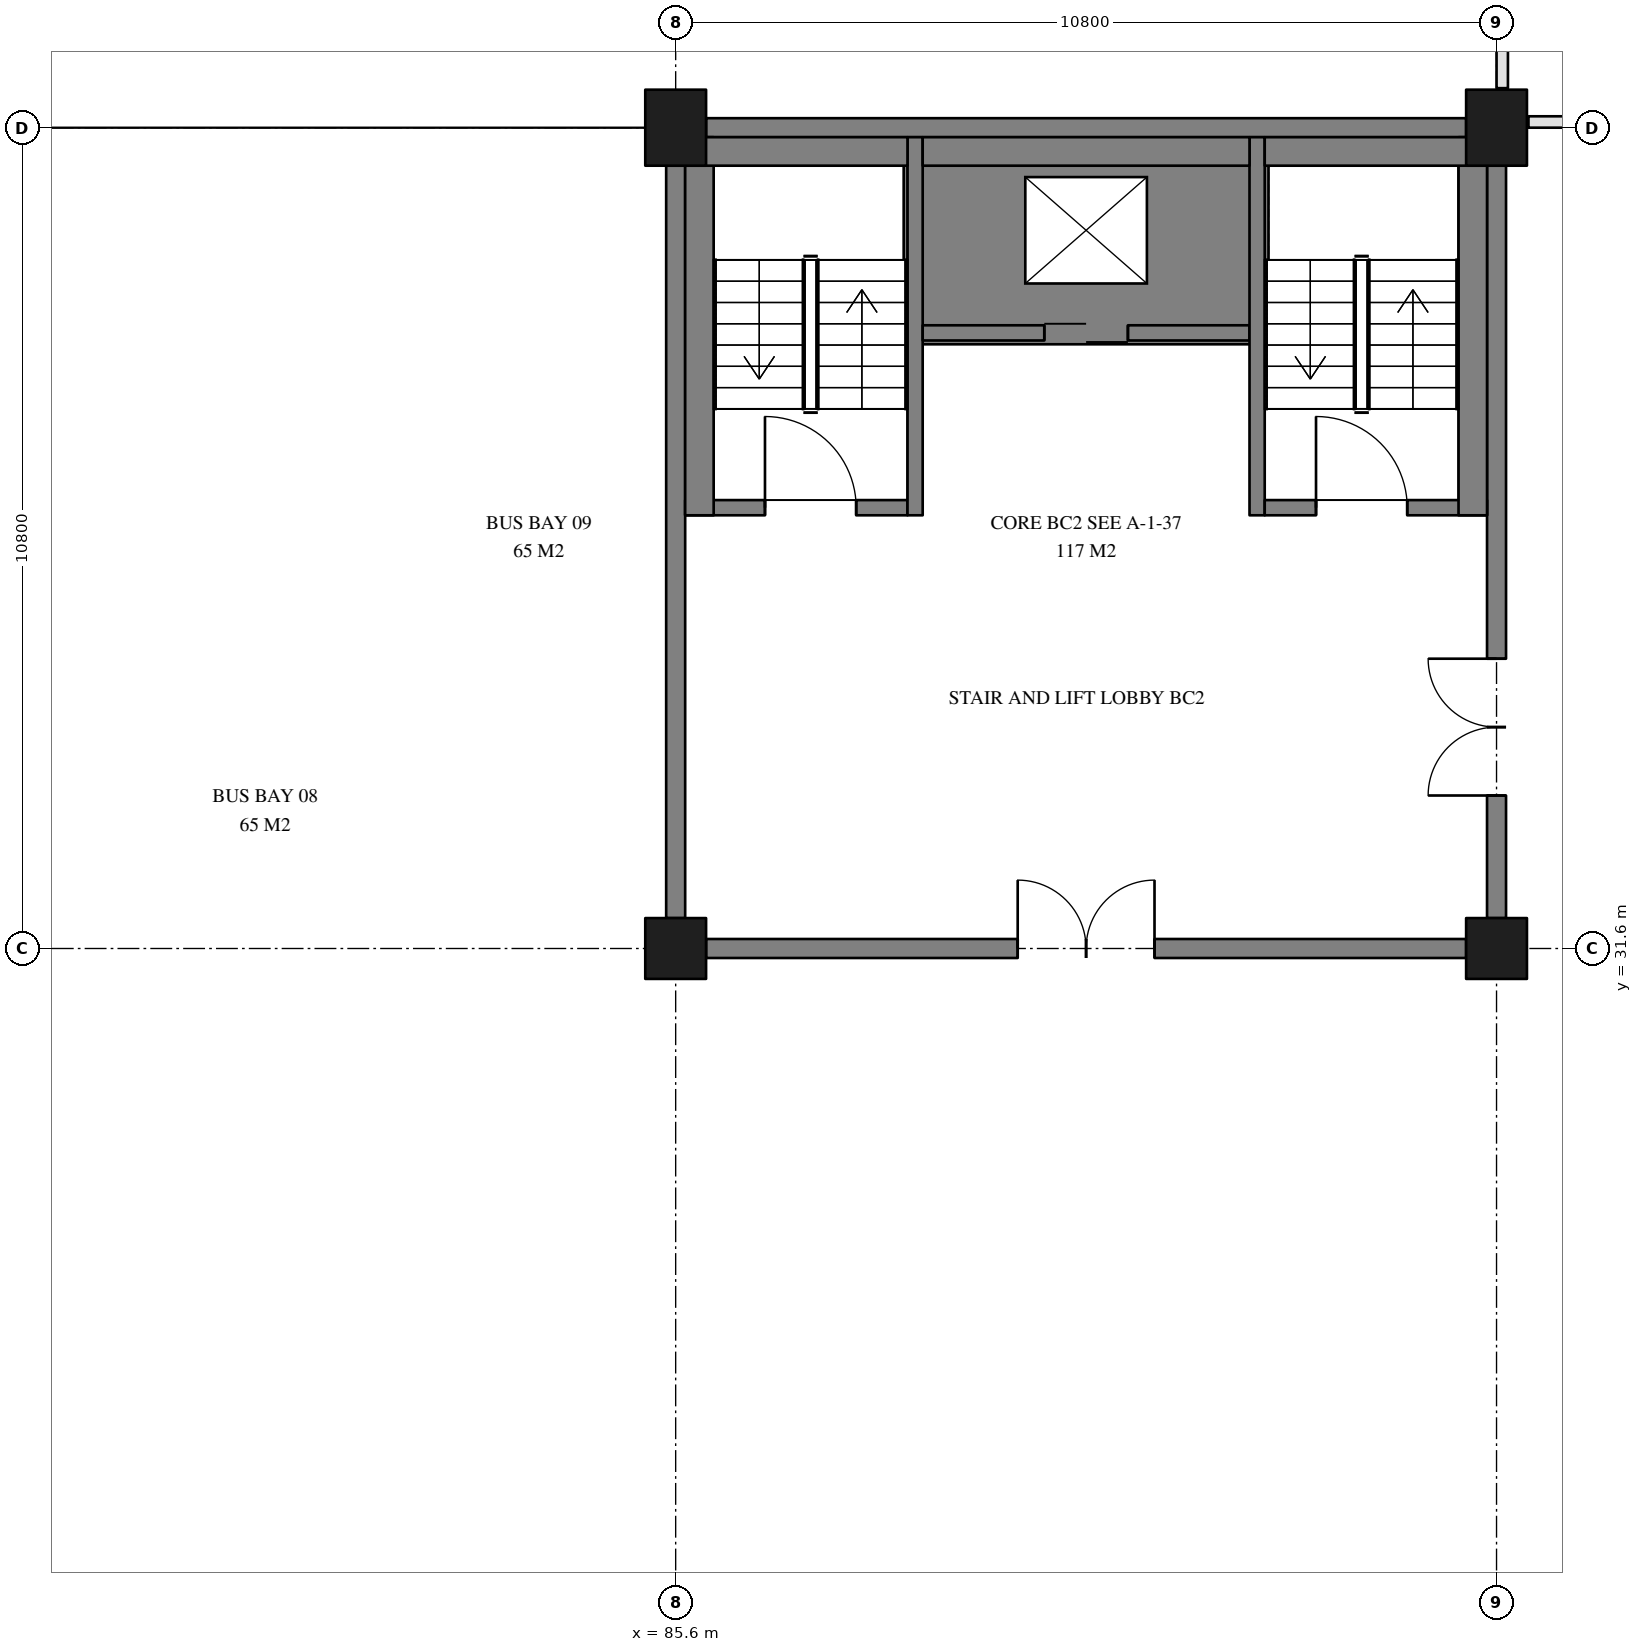
"""IFC4 building model, lengths in metres.
Left out: names, types, materials, properties, quantities, classifications, styles, units other than length and angle.
Written with IfcOpenShell. Run it as: python <this file> out.ifc"""

import sys

from ifc_helpers import new_model, si_unit, direction, frame, frame_2d, origin, origin_2d, place, context, subcontext, project, spatial, polyline, rectangle, outline, extrude, element, fill, save


model = new_model("IFC4")
c1 = context("Model", 3, precision=1e-05, world=origin(), true_north=direction((0.0, 1.0)))
c2 = subcontext(c1, "Body", "Model", "MODEL_VIEW")
j1 = project(units=[si_unit("LENGTHUNIT", "METRE"), si_unit("PLANEANGLEUNIT", "RADIAN")], contexts=[c1])
p1 = place(None, origin())
s1 = spatial("IfcSite", under=j1, at=p1, CompositionType="ELEMENT")
p2 = place(p1, origin())
s2 = spatial("IfcBuilding", under=s1, at=p2, CompositionType="ELEMENT")
p3 = place(p2, frame((0.0, 0.0, -5.4)))
s3 = spatial("IfcBuildingStorey", under=s2, at=p3, CompositionType="ELEMENT", Elevation=-5.4)
for number, where, z_axis, x_axis in (
    (1, (85.6, 42.4, -0.4), (0.0, 0.0, 1.0), (1.0, 0.0, 0.0)),
    (2, (96.4, 42.4, -0.4), (0.0, 0.0, 1.0), (1.0, 0.0, 0.0)),
):
    element("IfcColumn", number, at=place(p3, frame(where, z_axis=z_axis, x_axis=x_axis)), inside=s3, PredefinedType="COLUMN", context=c2, shape_type="SweptSolid", body=[
        extrude(rectangle(XDim=0.8, YDim=1.0, at=origin_2d()), origin(), (0.0, 0.0, 1.0), 5.8),
    ])
for number, where, z_axis, x_axis in (
    (3, (85.6, 31.6, -0.4), (0.0, 0.0, 1.0), (1.0, 0.0, 0.0)),
    (4, (96.4, 31.6, -0.4), (0.0, 0.0, 1.0), (1.0, 0.0, 0.0)),
):
    element("IfcColumn", number, at=place(p3, frame(where, z_axis=z_axis, x_axis=x_axis)), inside=s3, PredefinedType="COLUMN", context=c2, shape_type="SweptSolid", body=[
        extrude(rectangle(XDim=0.8, YDim=0.8, at=origin_2d()), origin(), (0.0, 0.0, 1.0), 5.8),
    ])
p4 = place(p3, frame((0.0, 0.0, -1.4)))
e5 = element("IfcWall", 5, at=p4, inside=s3, PredefinedType="SOLIDWALL", context=c2, shape_type="SweptSolid", body=[
    extrude(outline(polyline([(88.6, 39.55), (93.4, 39.55), (93.4, 42.15), (88.6, 42.15), (88.6, 39.55)]), holes=[polyline([(93.15, 39.8), (93.15, 41.9), (88.85, 41.9), (88.85, 39.8), (93.15, 39.8)])]), origin(), (0.0, 0.0, 1.0), 1.4),
])
p5 = place(p3, frame((86.0, 31.6, 0.0), z_axis=(0.0, 0.0, 1.0), x_axis=(1.0, 0.0, 0.0)))
e6 = element("IfcWall", 6, at=p5, inside=s3, PredefinedType="SOLIDWALL", context=c2, shape_type="SweptSolid", body=[
    extrude(rectangle(XDim=10.0, YDim=0.25, at=frame_2d((5.0, 0.0))), origin(), (0.0, 0.0, 1.0), 5.4),
])
p6 = place(p5, frame((4.1, 0.0, 0.0)))
e7 = element("IfcOpeningElement", 7, at=p6, cuts=e6, PredefinedType="OPENING", context=c2, shape_type="SweptSolid", body=[
    extrude(rectangle(XDim=1.8, YDim=2.1, at=frame_2d((0.9, 1.05))), frame((0.0, 0.135, 0.0), z_axis=(0.0, -1.0, 0.0), x_axis=(1.0, 0.0, 0.0)), (0.0, 0.0, 1.0), 0.27),
])
p7 = place(p3, frame((96.4, 32.0, 0.0), z_axis=(0.0, 0.0, 1.0), x_axis=(0.0, 1.0, 0.0)))
e8 = element("IfcWall", 8, at=p7, inside=s3, PredefinedType="SOLIDWALL", context=c2, shape_type="SweptSolid", body=[
    extrude(rectangle(XDim=9.9, YDim=0.25, at=frame_2d((4.95, 0.0))), origin(), (0.0, 0.0, 1.0), 5.4),
])
p8 = place(p7, frame((1.613, 0.0, 0.0)))
e9 = element("IfcOpeningElement", 9, at=p8, cuts=e8, PredefinedType="OPENING", context=c2, shape_type="SweptSolid", body=[
    extrude(rectangle(XDim=1.8, YDim=2.1, at=frame_2d((0.9, 1.05))), frame((0.0, 0.135, 0.0), z_axis=(0.0, -1.0, 0.0), x_axis=(1.0, 0.0, 0.0)), (0.0, 0.0, 1.0), 0.27),
])
p9 = place(p3, frame((96.0, 42.4, 0.0), z_axis=(0.0, 0.0, 1.0), x_axis=(-1.0, 0.0, 0.0)))
e10 = element("IfcWall", 10, at=p9, inside=s3, PredefinedType="SOLIDWALL", context=c2, shape_type="SweptSolid", body=[
    extrude(rectangle(XDim=10.0, YDim=0.25, at=frame_2d((5.0, 0.0))), origin(), (0.0, 0.0, 1.0), 5.4),
])
p10 = place(p3, frame((85.6, 41.9, 0.0), z_axis=(0.0, 0.0, 1.0), x_axis=(0.0, -1.0, 0.0)))
e11 = element("IfcWall", 11, at=p10, inside=s3, PredefinedType="SOLIDWALL", context=c2, shape_type="SweptSolid", body=[
    extrude(rectangle(XDim=9.9, YDim=0.25, at=frame_2d((4.95, 0.0))), origin(), (0.0, 0.0, 1.0), 5.4),
])
p11 = place(p3, frame((85.725, 37.4, 0.0), z_axis=(0.0, 0.0, 1.0), x_axis=(1.0, 0.0, 0.0)))
e12 = element("IfcWall", 12, at=p11, inside=s3, PredefinedType="SOLIDWALL", context=c2, shape_type="SweptSolid", body=[
    extrude(rectangle(XDim=2.925, YDim=0.2, at=frame_2d((1.462, 0.0))), origin(), (0.0, 0.0, 1.0), 4.8),
])
p12 = place(p11, frame((1.05, 0.0, 0.0)))
e13 = element("IfcOpeningElement", 13, at=p12, cuts=e12, PredefinedType="OPENING", context=c2, shape_type="SweptSolid", body=[
    extrude(rectangle(XDim=1.2, YDim=2.1, at=frame_2d((0.6, 1.05))), frame((0.0, 0.11, 0.0), z_axis=(0.0, -1.0, 0.0), x_axis=(1.0, 0.0, 0.0)), (0.0, 0.0, 1.0), 0.22),
])
p13 = place(p3, frame((88.75, 37.3, 0.0), z_axis=(0.0, 0.0, 1.0), x_axis=(0.0, 1.0, 0.0)))
e14 = element("IfcWall", 14, at=p13, inside=s3, PredefinedType="SOLIDWALL", context=c2, shape_type="SweptSolid", body=[
    extrude(rectangle(XDim=4.975, YDim=0.2, at=frame_2d((2.487, 0.0))), origin(), (0.0, 0.0, 1.0), 4.8),
])
p14 = place(p3, frame((88.85, 39.7, 0.0), z_axis=(0.0, 0.0, 1.0), x_axis=(1.0, 0.0, 0.0)))
e15 = element("IfcWall", 15, at=p14, inside=s3, PredefinedType="SOLIDWALL", context=c2, shape_type="SweptSolid", body=[
    extrude(rectangle(XDim=4.3, YDim=0.2, at=frame_2d((2.15, 0.0))), origin(), (0.0, 0.0, 1.0), 4.8),
])
p15 = place(p14, frame((1.6, 0.0, 0.0)))
e16 = element("IfcOpeningElement", 16, at=p15, cuts=e15, PredefinedType="OPENING", context=c2, shape_type="SweptSolid", body=[
    extrude(rectangle(XDim=1.1, YDim=2.1, at=frame_2d((0.55, 1.05))), frame((0.0, 0.11, 0.0), z_axis=(0.0, -1.0, 0.0), x_axis=(1.0, 0.0, 0.0)), (0.0, 0.0, 1.0), 0.22),
])
p16 = place(p3, frame((93.25, 37.3, 0.0), z_axis=(0.0, 0.0, 1.0), x_axis=(0.0, 1.0, 0.0)))
e17 = element("IfcWall", 17, at=p16, inside=s3, PredefinedType="SOLIDWALL", context=c2, shape_type="SweptSolid", body=[
    extrude(rectangle(XDim=4.975, YDim=0.2, at=frame_2d((2.487, 0.0))), origin(), (0.0, 0.0, 1.0), 4.8),
])
p17 = place(p3, frame((93.35, 37.4, 0.0), z_axis=(0.0, 0.0, 1.0), x_axis=(1.0, 0.0, 0.0)))
e18 = element("IfcWall", 18, at=p17, inside=s3, PredefinedType="SOLIDWALL", context=c2, shape_type="SweptSolid", body=[
    extrude(rectangle(XDim=2.925, YDim=0.2, at=frame_2d((1.462, 0.0))), origin(), (0.0, 0.0, 1.0), 4.8),
])
p18 = place(p17, frame((0.675, 0.0, 0.0)))
e19 = element("IfcOpeningElement", 19, at=p18, cuts=e18, PredefinedType="OPENING", context=c2, shape_type="SweptSolid", body=[
    extrude(rectangle(XDim=1.2, YDim=2.1, at=frame_2d((0.6, 1.05))), frame((0.0, 0.11, 0.0), z_axis=(0.0, -1.0, 0.0), x_axis=(1.0, 0.0, 0.0)), (0.0, 0.0, 1.0), 0.22),
])
p19 = place(p3, frame((85.913, 37.3, 0.0), z_axis=(0.0, 0.0, 1.0), x_axis=(0.0, 1.0, 0.0)))
e20 = element("IfcWall", 20, at=p19, inside=s3, PredefinedType="SOLIDWALL", context=c2, shape_type="SweptSolid", body=[
    extrude(rectangle(XDim=4.975, YDim=0.375, at=frame_2d((2.487, 0.0))), origin(), (0.0, 0.0, 1.0), 4.8),
])
p20 = place(p3, frame((85.725, 42.087, 0.0), z_axis=(0.0, 0.0, 1.0), x_axis=(1.0, 0.0, 0.0)))
e21 = element("IfcWall", 21, at=p20, inside=s3, PredefinedType="SOLIDWALL", context=c2, shape_type="SweptSolid", body=[
    extrude(rectangle(XDim=2.925, YDim=0.375, at=frame_2d((1.462, 0.0))), origin(), (0.0, 0.0, 1.0), 4.8),
])
p21 = place(p3, frame((96.087, 37.3, 0.0), z_axis=(0.0, 0.0, 1.0), x_axis=(0.0, 1.0, 0.0)))
e22 = element("IfcWall", 22, at=p21, inside=s3, PredefinedType="SOLIDWALL", context=c2, shape_type="SweptSolid", body=[
    extrude(rectangle(XDim=4.975, YDim=0.375, at=frame_2d((2.487, 0.0))), origin(), (0.0, 0.0, 1.0), 4.8),
])
p22 = place(p3, frame((93.35, 42.087, 0.0), z_axis=(0.0, 0.0, 1.0), x_axis=(1.0, 0.0, 0.0)))
e23 = element("IfcWall", 23, at=p22, inside=s3, PredefinedType="SOLIDWALL", context=c2, shape_type="SweptSolid", body=[
    extrude(rectangle(XDim=2.925, YDim=0.375, at=frame_2d((1.462, 0.0))), origin(), (0.0, 0.0, 1.0), 4.8),
])
p23 = place(p3, frame((88.85, 42.087, 0.0), z_axis=(0.0, 0.0, 1.0), x_axis=(1.0, 0.0, 0.0)))
e24 = element("IfcWall", 24, at=p23, inside=s3, PredefinedType="SOLIDWALL", context=c2, shape_type="SweptSolid", body=[
    extrude(rectangle(XDim=4.3, YDim=0.375, at=frame_2d((2.15, 0.0))), origin(), (0.0, 0.0, 1.0), 4.8),
])
p24 = place(p3, frame((96.475, 42.92, 0.0), z_axis=(0.0, 0.0, 1.0), x_axis=(0.0, 1.0, 0.0)))
e25 = element("IfcWall", 25, at=p24, inside=s3, PredefinedType="PARTITIONING", context=c2, shape_type="SweptSolid", body=[
    extrude(rectangle(XDim=9.76, YDim=0.15, at=frame_2d((4.88, 0.0))), origin(), (0.0, 0.0, 1.0), 3.8),
])
p25 = place(p3, frame((96.82, 42.475, 0.0), z_axis=(0.0, 0.0, 1.0), x_axis=(1.0, 0.0, 0.0)))
e26 = element("IfcWall", 26, at=p25, inside=s3, PredefinedType="PARTITIONING", context=c2, shape_type="SweptSolid", body=[
    extrude(rectangle(XDim=3.18, YDim=0.15, at=frame_2d((1.59, 0.0))), origin(), (0.0, 0.0, 1.0), 3.8),
])
p26 = place(p15, frame((1.1, 0.0, 0.0), z_axis=(0.0, 0.0, 1.0), x_axis=(-1.0, 0.0, 0.0)))
e27 = element("IfcDoor", 27, at=p26, inside=s3, OperationType="DOUBLE_DOOR_SLIDING", PredefinedType="DOOR", context=c2, shape_type="SweptSolid", body=[
    extrude(rectangle(XDim=1.1, YDim=2.1, at=frame_2d((0.55, 1.05))), frame((0.0, 0.025, 0.0), z_axis=(0.0, -1.0, 0.0), x_axis=(1.0, 0.0, 0.0)), (0.0, 0.0, 1.0), 0.05),
])
fill(e16, e27)
p27 = place(p12, frame((1.2, 0.0, 0.0), z_axis=(0.0, 0.0, 1.0), x_axis=(-1.0, 0.0, 0.0)))
e28 = element("IfcDoor", 28, at=p27, inside=s3, OperationType="SINGLE_SWING_LEFT", PredefinedType="DOOR", context=c2, shape_type="SweptSolid", body=[
    extrude(rectangle(XDim=1.2, YDim=2.1, at=frame_2d((0.6, 1.05))), frame((0.0, 0.025, 0.0), z_axis=(0.0, -1.0, 0.0), x_axis=(1.0, 0.0, 0.0)), (0.0, 0.0, 1.0), 0.05),
])
fill(e13, e28)
p28 = place(p18, frame((1.2, 0.0, 0.0), z_axis=(0.0, 0.0, 1.0), x_axis=(-1.0, 0.0, 0.0)))
e29 = element("IfcDoor", 29, at=p28, inside=s3, OperationType="SINGLE_SWING_RIGHT", PredefinedType="DOOR", context=c2, shape_type="SweptSolid", body=[
    extrude(rectangle(XDim=1.2, YDim=2.1, at=frame_2d((0.6, 1.05))), frame((0.0, 0.025, 0.0), z_axis=(0.0, -1.0, 0.0), x_axis=(1.0, 0.0, 0.0)), (0.0, 0.0, 1.0), 0.05),
])
fill(e19, e29)
p29 = place(p6, frame((1.8, 0.0, 0.0), z_axis=(0.0, 0.0, 1.0), x_axis=(-1.0, 0.0, 0.0)))
e30 = element("IfcDoor", 30, at=p29, inside=s3, OperationType="DOUBLE_DOOR_DOUBLE_SWING", PredefinedType="DOOR", context=c2, shape_type="SweptSolid", body=[
    extrude(rectangle(XDim=1.8, YDim=2.1, at=frame_2d((0.9, 1.05))), frame((0.0, 0.025, 0.0), z_axis=(0.0, -1.0, 0.0), x_axis=(1.0, 0.0, 0.0)), (0.0, 0.0, 1.0), 0.05),
])
fill(e7, e30)
p30 = place(p8, frame((1.8, 0.0, 0.0), z_axis=(0.0, 0.0, 1.0), x_axis=(-1.0, 0.0, 0.0)))
e31 = element("IfcDoor", 31, at=p30, inside=s3, OperationType="DOUBLE_DOOR_DOUBLE_SWING", PredefinedType="DOOR", context=c2, shape_type="SweptSolid", body=[
    extrude(rectangle(XDim=1.8, YDim=2.1, at=frame_2d((0.9, 1.05))), frame((0.0, 0.025, 0.0), z_axis=(0.0, -1.0, 0.0), x_axis=(1.0, 0.0, 0.0)), (0.0, 0.0, 1.0), 0.05),
])
fill(e9, e31)
save(model, sys.argv[1])
